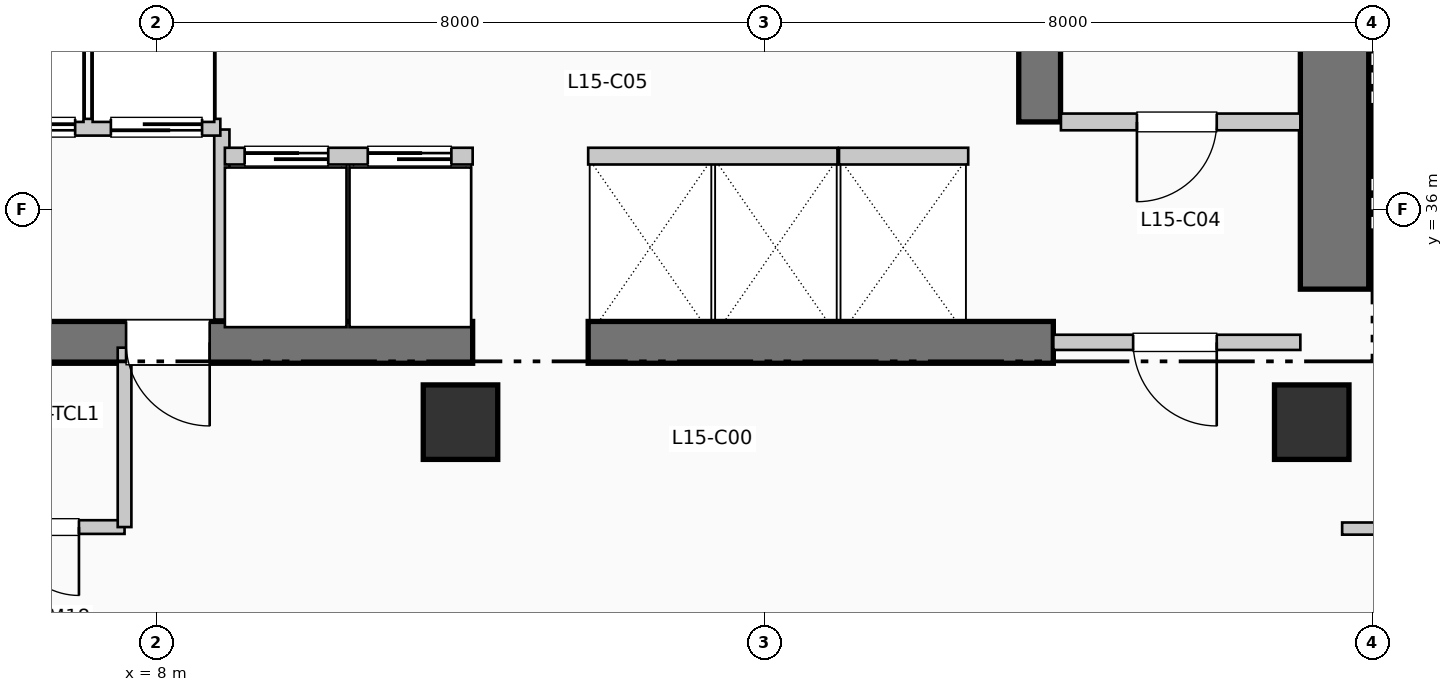
"""IFC4 building model, lengths in metres.
Left out: names, types, materials, properties, quantities, classifications, styles, units other than length and angle.
Written with IfcOpenShell. Run it as: python <this file> out.ifc"""

import sys

from ifc_helpers import new_model, si_unit, direction, frame, frame_2d, origin, origin_2d, place, context, subcontext, project, spatial, rectangle, extrude, element, fill, save


model = new_model("IFC4")
c1 = context("Model", 3, precision=1e-05, world=origin(), true_north=direction((0.0, 1.0)))
c2 = subcontext(c1, "Body", "Model", "MODEL_VIEW")
j1 = project(units=[si_unit("LENGTHUNIT", "METRE"), si_unit("PLANEANGLEUNIT", "RADIAN")], contexts=[c1])
p1 = place(None, origin())
s1 = spatial("IfcSite", under=j1, at=p1, CompositionType="ELEMENT")
p2 = place(p1, origin())
s2 = spatial("IfcBuilding", under=s1, at=p2, CompositionType="ELEMENT")
p3 = place(p2, frame((0.0, 0.0, 66.0)))
s3 = spatial("IfcBuildingStorey", under=s2, at=p3, CompositionType="ELEMENT", Elevation=66.0)
p4 = place(p3, frame((23.5, 34.95, 0.0), z_axis=(0.0, 0.0, 1.0), x_axis=(0.0, 1.0, 0.0)))
e1 = element("IfcWall", 1, at=p4, inside=s3, PredefinedType="SHEAR", context=c2, shape_type="SweptSolid", body=[
    extrude(rectangle(XDim=10.64, YDim=0.9, at=frame_2d((5.32, 0.0))), origin(), (0.0, 0.0, 1.0), 3.96),
])
p5 = place(p3, frame((1.45, 34.25, 0.0), z_axis=(0.0, 0.0, 1.0), x_axis=(1.0, 0.0, 0.0)))
e2 = element("IfcWall", 2, at=p5, inside=s3, PredefinedType="SHEAR", context=c2, shape_type="SweptSolid", body=[
    extrude(rectangle(XDim=10.71, YDim=0.55, at=frame_2d((5.355, 0.0))), origin(), (0.0, 0.0, 1.0), 3.96),
])
p6 = place(p5, frame((7.25, 0.0, 0.0), z_axis=(0.0, 0.0, 1.0), x_axis=(-1.0, 0.0, 0.0)))
e3 = element("IfcOpeningElement", 3, at=p6, cuts=e2, PredefinedType="OPENING", context=c2, shape_type="SweptSolid", body=[
    extrude(rectangle(XDim=1.1, YDim=2.15, at=frame_2d((0.55, 1.075))), frame((0.0, 0.285, 0.0), z_axis=(0.0, -1.0, 0.0), x_axis=(1.0, 0.0, 0.0)), (0.0, 0.0, 1.0), 0.57),
])
p7 = place(p3, frame((13.68, 34.25, 0.0), z_axis=(0.0, 0.0, 1.0), x_axis=(1.0, 0.0, 0.0)))
e4 = element("IfcWall", 4, at=p7, inside=s3, PredefinedType="SHEAR", context=c2, shape_type="SweptSolid", body=[
    extrude(rectangle(XDim=6.12, YDim=0.55, at=frame_2d((3.06, 0.0))), origin(), (0.0, 0.0, 1.0), 3.96),
])
p8 = place(p3, frame((19.62, 37.15, 0.0), z_axis=(0.0, 0.0, 1.0), x_axis=(0.0, 1.0, 0.0)))
e5 = element("IfcWall", 5, at=p8, inside=s3, PredefinedType="SHEAR", context=c2, shape_type="SweptSolid", body=[
    extrude(rectangle(XDim=7.89, YDim=0.55, at=frame_2d((3.945, 0.0))), origin(), (0.0, 0.0, 1.0), 3.96),
])
for number, where, z_axis, x_axis in (
    (6, (12.0, 33.2, 0.0), (0.0, 0.0, 1.0), (1.0, 0.0, 0.0)),
    (7, (23.2, 33.2, 0.0), (0.0, 0.0, 1.0), (1.0, 0.0, 0.0)),
):
    element("IfcColumn", number, at=place(p3, frame(where, z_axis=z_axis, x_axis=x_axis)), inside=s3, PredefinedType="COLUMN", context=c2, shape_type="SweptSolid", body=[
        extrude(rectangle(XDim=0.98, YDim=0.98, at=origin_2d()), origin(), (0.0, 0.0, 1.0), 3.96),
    ])
p9 = place(p3, frame((8.86, 34.55, 0.0), z_axis=(0.0, 0.0, 1.0), x_axis=(0.0, 1.0, 0.0)))
e8 = element("IfcWall", 8, at=p9, inside=s3, PredefinedType="PARTITIONING", context=c2, shape_type="SweptSolid", body=[
    extrude(rectangle(XDim=2.5, YDim=0.2, at=frame_2d((1.25, 0.0))), origin(), (0.0, 0.0, 1.0), 3.71),
])
p10 = place(p3, frame((19.9, 37.15, 0.0), z_axis=(0.0, 0.0, 1.0), x_axis=(1.0, 0.0, 0.0)))
e9 = element("IfcWall", 9, at=p10, inside=s3, PredefinedType="PARTITIONING", context=c2, shape_type="SweptSolid", body=[
    extrude(rectangle(XDim=3.15, YDim=0.22, at=frame_2d((1.575, 0.0))), origin(), (0.0, 0.0, 1.0), 3.71),
])
p11 = place(p10, frame((2.05, 0.0, 0.0), z_axis=(0.0, 0.0, 1.0), x_axis=(-1.0, 0.0, 0.0)))
e10 = element("IfcOpeningElement", 10, at=p11, cuts=e9, PredefinedType="OPENING", context=c2, shape_type="SweptSolid", body=[
    extrude(rectangle(XDim=1.05, YDim=2.15, at=frame_2d((0.525, 1.075))), frame((0.0, 0.12, 0.0), z_axis=(0.0, -1.0, 0.0), x_axis=(1.0, 0.0, 0.0)), (0.0, 0.0, 1.0), 0.24),
])
p12 = place(p3, frame((19.8, 34.25, 0.0), z_axis=(0.0, 0.0, 1.0), x_axis=(1.0, 0.0, 0.0)))
e11 = element("IfcWall", 11, at=p12, inside=s3, PredefinedType="PARTITIONING", context=c2, shape_type="SweptSolid", body=[
    extrude(rectangle(XDim=3.25, YDim=0.2, at=frame_2d((1.625, 0.0))), origin(), (0.0, 0.0, 1.0), 3.71),
])
p13 = place(p12, frame((2.15, 0.0, 0.0), z_axis=(0.0, 0.0, 1.0), x_axis=(-1.0, 0.0, 0.0)))
e12 = element("IfcOpeningElement", 12, at=p13, cuts=e11, PredefinedType="OPENING", context=c2, shape_type="SweptSolid", body=[
    extrude(rectangle(XDim=1.1, YDim=2.15, at=frame_2d((0.55, 1.075))), frame((0.0, 0.11, 0.0), z_axis=(0.0, -1.0, 0.0), x_axis=(1.0, 0.0, 0.0)), (0.0, 0.0, 1.0), 0.22),
])
p14 = place(p3, frame((5.38, 37.08, 0.0), z_axis=(0.0, 0.0, 1.0), x_axis=(1.0, 0.0, 0.0)))
e13 = element("IfcWall", 13, at=p14, inside=s3, PredefinedType="PARTITIONING", context=c2, shape_type="SweptSolid", body=[
    extrude(rectangle(XDim=3.46, YDim=0.22, at=frame_2d((1.73, 0.0))), origin(), (0.0, 0.0, 1.0), 3.71),
])
p15 = place(p14, frame((1.55, 0.0, 0.0), z_axis=(0.0, 0.0, 1.0), x_axis=(-1.0, 0.0, 0.0)))
e14 = element("IfcOpeningElement", 14, at=p15, cuts=e13, PredefinedType="OPENING", context=c2, shape_type="SweptSolid", body=[
    extrude(rectangle(XDim=1.2, YDim=2.2, at=frame_2d((0.6, 1.1))), frame((0.0, 0.12, 0.0), z_axis=(0.0, -1.0, 0.0), x_axis=(1.0, 0.0, 0.0)), (0.0, 0.0, 1.0), 0.24),
])
p16 = place(p14, frame((3.22, 0.0, 0.0), z_axis=(0.0, 0.0, 1.0), x_axis=(-1.0, 0.0, 0.0)))
e15 = element("IfcOpeningElement", 15, at=p16, cuts=e13, PredefinedType="OPENING", context=c2, shape_type="SweptSolid", body=[
    extrude(rectangle(XDim=1.2, YDim=2.2, at=frame_2d((0.6, 1.1))), frame((0.0, 0.12, 0.0), z_axis=(0.0, -1.0, 0.0), x_axis=(1.0, 0.0, 0.0)), (0.0, 0.0, 1.0), 0.24),
])
p17 = place(p3, frame((5.5, 31.82, 0.0), z_axis=(0.0, 0.0, 1.0), x_axis=(1.0, 0.0, 0.0)))
e16 = element("IfcWall", 16, at=p17, inside=s3, PredefinedType="PLUMBINGWALL", context=c2, shape_type="SweptSolid", body=[
    extrude(rectangle(XDim=2.08, YDim=0.18, at=frame_2d((1.04, 0.0))), origin(), (0.0, 0.0, 1.0), 3.71),
])
p18 = place(p17, frame((1.48, 0.0, 0.0), z_axis=(0.0, 0.0, 1.0), x_axis=(-1.0, 0.0, 0.0)))
e17 = element("IfcOpeningElement", 17, at=p18, cuts=e16, PredefinedType="OPENING", context=c2, shape_type="SweptSolid", body=[
    extrude(rectangle(XDim=0.9, YDim=2.1, at=frame_2d((0.45, 1.05))), frame((0.0, 0.1, 0.0), z_axis=(0.0, -1.0, 0.0), x_axis=(1.0, 0.0, 0.0)), (0.0, 0.0, 1.0), 0.2),
])
p19 = place(p3, frame((7.58, 31.82, 0.0), z_axis=(0.0, 0.0, 1.0), x_axis=(0.0, 1.0, 0.0)))
e18 = element("IfcWall", 18, at=p19, inside=s3, PredefinedType="PLUMBINGWALL", context=c2, shape_type="SweptSolid", body=[
    extrude(rectangle(XDim=2.36, YDim=0.18, at=frame_2d((1.18, 0.0))), origin(), (0.0, 0.0, 1.0), 3.71),
])
p20 = place(p3, frame((8.9, 36.7, 0.0), z_axis=(0.0, 0.0, 1.0), x_axis=(1.0, 0.0, 0.0)))
e19 = element("IfcWall", 19, at=p20, inside=s3, PredefinedType="PARTITIONING", context=c2, shape_type="SweptSolid", body=[
    extrude(rectangle(XDim=3.26, YDim=0.22, at=frame_2d((1.63, 0.0))), origin(), (0.0, 0.0, 1.0), 3.71),
])
p21 = place(p20, frame((0.26, 0.0, 0.0)))
e20 = element("IfcOpeningElement", 20, at=p21, cuts=e19, PredefinedType="OPENING", context=c2, shape_type="SweptSolid", body=[
    extrude(rectangle(XDim=1.1, YDim=2.2, at=frame_2d((0.55, 1.1))), frame((0.0, 0.12, 0.0), z_axis=(0.0, -1.0, 0.0), x_axis=(1.0, 0.0, 0.0)), (0.0, 0.0, 1.0), 0.24),
])
p22 = place(p20, frame((1.88, 0.0, 0.0)))
e21 = element("IfcOpeningElement", 21, at=p22, cuts=e19, PredefinedType="OPENING", context=c2, shape_type="SweptSolid", body=[
    extrude(rectangle(XDim=1.1, YDim=2.2, at=frame_2d((0.55, 1.1))), frame((0.0, 0.12, 0.0), z_axis=(0.0, -1.0, 0.0), x_axis=(1.0, 0.0, 0.0)), (0.0, 0.0, 1.0), 0.24),
])
p23 = place(p3, frame((13.68, 36.7, 0.0), z_axis=(0.0, 0.0, 1.0), x_axis=(1.0, 0.0, 0.0)))
e22 = element("IfcWall", 22, at=p23, inside=s3, PredefinedType="PARTITIONING", context=c2, shape_type="SweptSolid", body=[
    extrude(rectangle(XDim=3.28, YDim=0.22, at=frame_2d((1.64, 0.0))), origin(), (0.0, 0.0, 1.0), 3.71),
])
p24 = place(p3, frame((16.98, 36.7, 0.0), z_axis=(0.0, 0.0, 1.0), x_axis=(1.0, 0.0, 0.0)))
e23 = element("IfcWall", 23, at=p24, inside=s3, PredefinedType="PARTITIONING", context=c2, shape_type="SweptSolid", body=[
    extrude(rectangle(XDim=1.7, YDim=0.22, at=frame_2d((0.85, 0.0))), origin(), (0.0, 0.0, 1.0), 3.71),
])
p25 = place(p3, frame((23.6, 31.8, 0.0), z_axis=(0.0, 0.0, 1.0), x_axis=(1.0, 0.0, 0.0)))
e24 = element("IfcWall", 24, at=p25, inside=s3, PredefinedType="PARTITIONING", context=c2, shape_type="SweptSolid", body=[
    extrude(rectangle(XDim=32.21, YDim=0.16, at=frame_2d((16.105, 0.0))), origin(), (0.0, 0.0, 1.0), 3.71),
])
p26 = place(p25, frame((3.068, 0.0, 0.0)))
e25 = element("IfcOpeningElement", 25, at=p26, cuts=e24, PredefinedType="OPENING", context=c2, shape_type="SweptSolid", body=[
    extrude(rectangle(XDim=0.95, YDim=2.15, at=frame_2d((0.475, 1.075))), frame((0.0, 0.09, 0.0), z_axis=(0.0, -1.0, 0.0), x_axis=(1.0, 0.0, 0.0)), (0.0, 0.0, 1.0), 0.18),
])
p27 = place(p25, frame((9.799, 0.0, 0.0)))
e26 = element("IfcOpeningElement", 26, at=p27, cuts=e24, PredefinedType="OPENING", context=c2, shape_type="SweptSolid", body=[
    extrude(rectangle(XDim=0.95, YDim=2.15, at=frame_2d((0.475, 1.075))), frame((0.0, 0.09, 0.0), z_axis=(0.0, -1.0, 0.0), x_axis=(1.0, 0.0, 0.0)), (0.0, 0.0, 1.0), 0.18),
])
p28 = place(p25, frame((19.334, 0.0, 0.0)))
e27 = element("IfcOpeningElement", 27, at=p28, cuts=e24, PredefinedType="OPENING", context=c2, shape_type="SweptSolid", body=[
    extrude(rectangle(XDim=0.95, YDim=2.15, at=frame_2d((0.475, 1.075))), frame((0.0, 0.09, 0.0), z_axis=(0.0, -1.0, 0.0), x_axis=(1.0, 0.0, 0.0)), (0.0, 0.0, 1.0), 0.18),
])
p29 = place(p25, frame((27.709, 0.0, 0.0)))
e28 = element("IfcOpeningElement", 28, at=p29, cuts=e24, PredefinedType="OPENING", context=c2, shape_type="SweptSolid", body=[
    extrude(rectangle(XDim=0.95, YDim=2.15, at=frame_2d((0.475, 1.075))), frame((0.0, 0.09, 0.0), z_axis=(0.0, -1.0, 0.0), x_axis=(1.0, 0.0, 0.0)), (0.0, 0.0, 1.0), 0.18),
])
p30 = place(p6, origin())
e29 = element("IfcDoor", 29, at=p30, inside=s3, OperationType="SINGLE_SWING_RIGHT", PredefinedType="DOOR", context=c2, shape_type="SweptSolid", body=[
    extrude(rectangle(XDim=1.1, YDim=2.15, at=frame_2d((0.55, 1.075))), frame((0.0, 0.025, 0.0), z_axis=(0.0, -1.0, 0.0), x_axis=(1.0, 0.0, 0.0)), (0.0, 0.0, 1.0), 0.05),
])
fill(e3, e29)
p31 = place(p11, origin())
e30 = element("IfcDoor", 30, at=p31, inside=s3, OperationType="SINGLE_SWING_LEFT", PredefinedType="DOOR", context=c2, shape_type="SweptSolid", body=[
    extrude(rectangle(XDim=1.05, YDim=2.15, at=frame_2d((0.525, 1.075))), frame((0.0, 0.025, 0.0), z_axis=(0.0, -1.0, 0.0), x_axis=(1.0, 0.0, 0.0)), (0.0, 0.0, 1.0), 0.05),
])
fill(e10, e30)
p32 = place(p13, origin())
e31 = element("IfcDoor", 31, at=p32, inside=s3, OperationType="SINGLE_SWING_RIGHT", PredefinedType="DOOR", context=c2, shape_type="SweptSolid", body=[
    extrude(rectangle(XDim=1.1, YDim=2.15, at=frame_2d((0.55, 1.075))), frame((0.0, 0.025, 0.0), z_axis=(0.0, -1.0, 0.0), x_axis=(1.0, 0.0, 0.0)), (0.0, 0.0, 1.0), 0.05),
])
fill(e12, e31)
p33 = place(p15, origin())
e32 = element("IfcDoor", 32, at=p33, inside=s3, OperationType="SLIDING_TO_RIGHT", PredefinedType="DOOR", context=c2, shape_type="SweptSolid", body=[
    extrude(rectangle(XDim=1.2, YDim=2.2, at=frame_2d((0.6, 1.1))), frame((0.0, 0.025, 0.0), z_axis=(0.0, -1.0, 0.0), x_axis=(1.0, 0.0, 0.0)), (0.0, 0.0, 1.0), 0.05),
])
fill(e14, e32)
p34 = place(p16, origin())
e33 = element("IfcDoor", 33, at=p34, inside=s3, OperationType="SLIDING_TO_RIGHT", PredefinedType="DOOR", context=c2, shape_type="SweptSolid", body=[
    extrude(rectangle(XDim=1.2, YDim=2.2, at=frame_2d((0.6, 1.1))), frame((0.0, 0.025, 0.0), z_axis=(0.0, -1.0, 0.0), x_axis=(1.0, 0.0, 0.0)), (0.0, 0.0, 1.0), 0.05),
])
fill(e15, e33)
p35 = place(p18, origin())
e34 = element("IfcDoor", 34, at=p35, inside=s3, OperationType="SINGLE_SWING_RIGHT", PredefinedType="DOOR", context=c2, shape_type="SweptSolid", body=[
    extrude(rectangle(XDim=0.9, YDim=2.1, at=frame_2d((0.45, 1.05))), frame((0.0, 0.025, 0.0), z_axis=(0.0, -1.0, 0.0), x_axis=(1.0, 0.0, 0.0)), (0.0, 0.0, 1.0), 0.05),
])
fill(e17, e34)
p36 = place(p21, origin())
e35 = element("IfcDoor", 35, at=p36, inside=s3, OperationType="SLIDING_TO_LEFT", PredefinedType="DOOR", context=c2, shape_type="SweptSolid", body=[
    extrude(rectangle(XDim=1.1, YDim=2.2, at=frame_2d((0.55, 1.1))), frame((0.0, 0.025, 0.0), z_axis=(0.0, -1.0, 0.0), x_axis=(1.0, 0.0, 0.0)), (0.0, 0.0, 1.0), 0.05),
])
fill(e20, e35)
p37 = place(p22, origin())
e36 = element("IfcDoor", 36, at=p37, inside=s3, OperationType="SLIDING_TO_LEFT", PredefinedType="DOOR", context=c2, shape_type="SweptSolid", body=[
    extrude(rectangle(XDim=1.1, YDim=2.2, at=frame_2d((0.55, 1.1))), frame((0.0, 0.025, 0.0), z_axis=(0.0, -1.0, 0.0), x_axis=(1.0, 0.0, 0.0)), (0.0, 0.0, 1.0), 0.05),
])
fill(e21, e36)
save(model, sys.argv[1])
